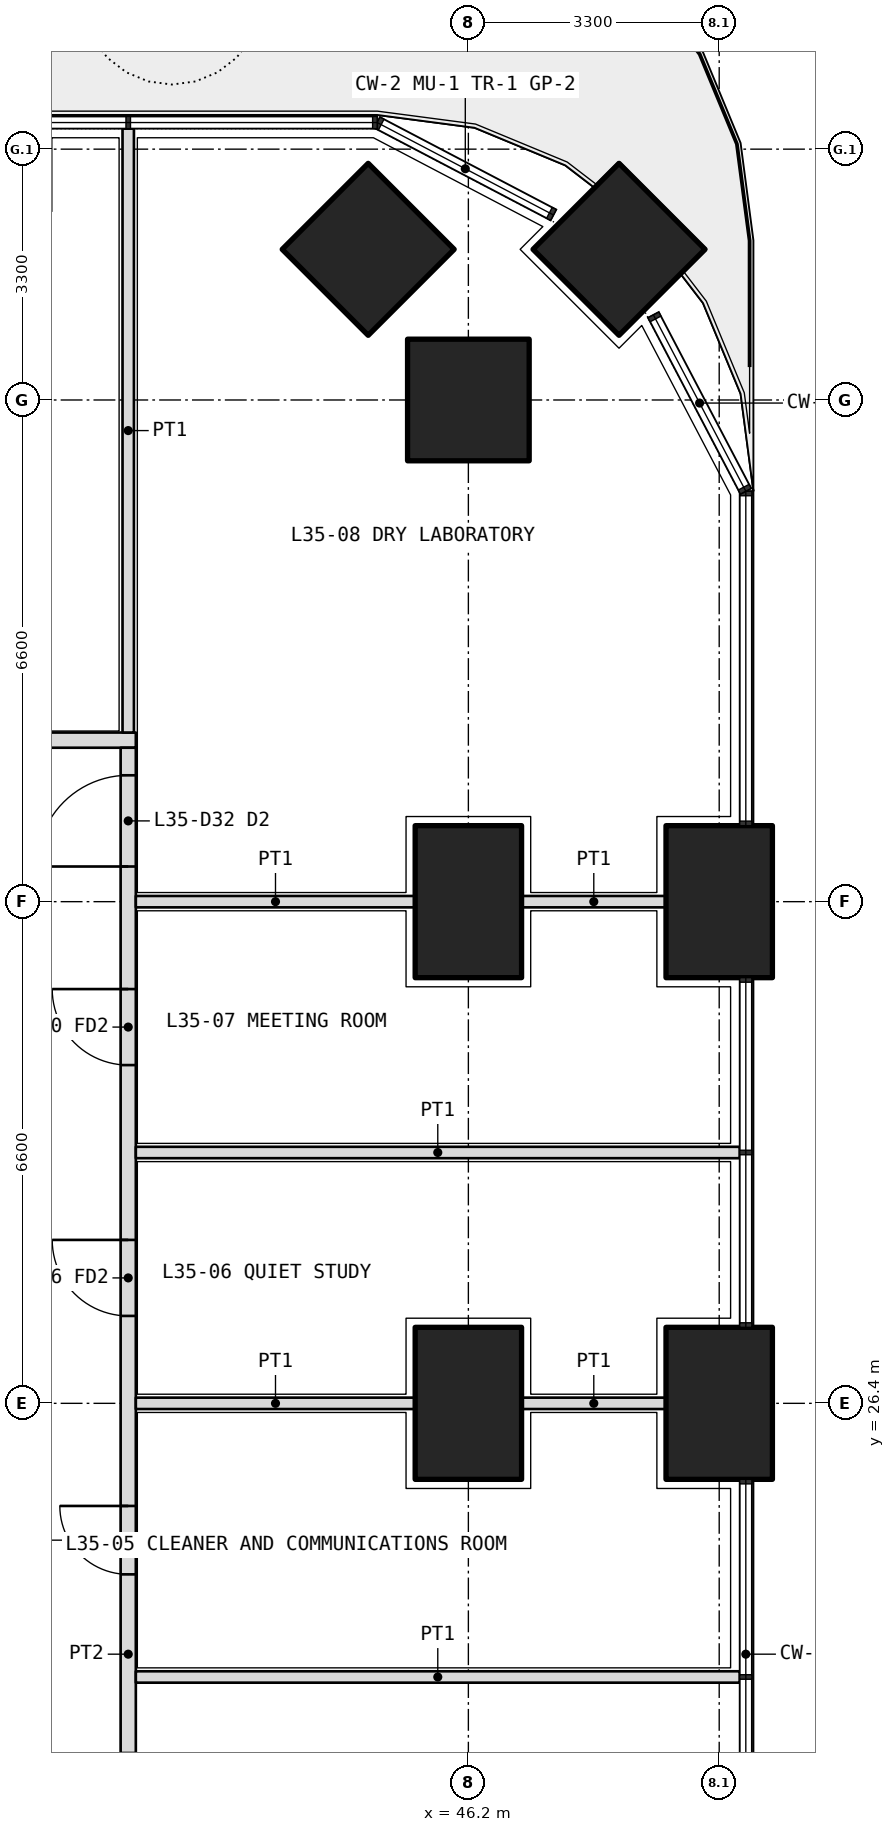
"""IFC4 building model, lengths in metres.
Left out: names, types, materials, properties, quantities, classifications, styles, units other than length and angle.
Written with IfcOpenShell. Run it as: python <this file> out.ifc"""

import sys

from ifc_helpers import new_model, si_unit, direction, frame, frame_2d, origin, origin_2d, place, context, subcontext, project, spatial, rectangle, extrude, element, fill, save


model = new_model("IFC4")
c1 = context("Model", 3, precision=1e-05, world=origin(), true_north=direction((0.0, 1.0)))
c2 = subcontext(c1, "Body", "Model", "MODEL_VIEW")
j1 = project(units=[si_unit("LENGTHUNIT", "METRE"), si_unit("PLANEANGLEUNIT", "RADIAN")], contexts=[c1])
p1 = place(None, origin())
s1 = spatial("IfcSite", under=j1, at=p1, CompositionType="ELEMENT")
p2 = place(p1, origin())
s2 = spatial("IfcBuilding", under=s1, at=p2, CompositionType="ELEMENT")
p3 = place(p2, frame((0.0, 0.0, 155.7)))
s3 = spatial("IfcBuildingStorey", under=s2, at=p3, CompositionType="ELEMENT", Elevation=155.7)
p4 = place(p3, frame((48.182, 41.582, 0.0), z_axis=(0.0, 0.0, 1.0), x_axis=(0.707106781187, 0.707106781187, 0.0)))
e1 = element("IfcColumn", 1, at=p4, inside=s3, PredefinedType="COLUMN", context=c2, shape_type="SweptSolid", body=[
    extrude(rectangle(XDim=1.6, YDim=1.6, at=origin_2d()), origin(), (0.0, 0.0, 1.0), 4.2),
])
for number, where, z_axis, x_axis in (
    (2, (49.5, 26.4, 0.0), (0.0, 0.0, 1.0), (0.0, 1.0, 0.0)),
    (3, (49.5, 33.0, 0.0), (0.0, 0.0, 1.0), (0.0, 1.0, 0.0)),
):
    element("IfcColumn", number, at=place(p3, frame(where, z_axis=z_axis, x_axis=x_axis)), inside=s3, PredefinedType="COLUMN", context=c2, shape_type="SweptSolid", body=[
        extrude(rectangle(XDim=2.0, YDim=1.4, at=origin_2d()), origin(), (0.0, 0.0, 1.0), 4.2),
    ])
for number, where, z_axis, x_axis in (
    (4, (46.2, 39.6, 0.0), (0.0, 0.0, 1.0), (1.0, 0.0, 0.0)),
    (5, (44.882, 41.582, 0.0), (0.0, 0.0, 1.0), (0.707, 0.707, 0.0)),
):
    element("IfcColumn", number, at=place(p3, frame(where, z_axis=z_axis, x_axis=x_axis)), inside=s3, PredefinedType="COLUMN", context=c2, shape_type="SweptSolid", body=[
        extrude(rectangle(XDim=1.6, YDim=1.6, at=origin_2d()), origin(), (0.0, 0.0, 1.0), 4.2),
    ])
for number, where, z_axis, x_axis in (
    (6, (46.2, 26.4, 0.0), (0.0, 0.0, 1.0), (0.0, 1.0, 0.0)),
    (7, (46.2, 33.0, 0.0), (0.0, 0.0, 1.0), (0.0, 1.0, 0.0)),
):
    element("IfcColumn", number, at=place(p3, frame(where, z_axis=z_axis, x_axis=x_axis)), inside=s3, PredefinedType="COLUMN", context=c2, shape_type="SweptSolid", body=[
        extrude(rectangle(XDim=2.0, YDim=1.4, at=origin_2d()), origin(), (0.0, 0.0, 1.0), 4.2),
    ])
p5 = place(p3, frame((10.975, 35.125, 0.0), z_axis=(0.0, 0.0, 1.0), x_axis=(1.0, 0.0, 0.0)))
e8 = element("IfcWall", 8, at=p5, inside=s3, PredefinedType="PARTITIONING", context=c2, shape_type="SweptSolid", body=[
    extrude(rectangle(XDim=30.85, YDim=0.2, at=frame_2d((15.425, 0.0))), origin(), (0.0, 0.0, 1.0), 2.85),
])
p6 = place(p5, frame((0.663, 0.0, 0.0)))
e9 = element("IfcOpeningElement", 9, at=p6, cuts=e8, PredefinedType="OPENING", context=c2, shape_type="SweptSolid", body=[
    extrude(rectangle(XDim=1.0, YDim=2.1, at=frame_2d((0.5, 1.05))), frame((0.0, 0.11, 0.0), z_axis=(0.0, -1.0, 0.0), x_axis=(1.0, 0.0, 0.0)), (0.0, 0.0, 1.0), 0.22),
])
p7 = place(p5, frame((3.275, 0.0, 0.0)))
e10 = element("IfcOpeningElement", 10, at=p7, cuts=e8, PredefinedType="OPENING", context=c2, shape_type="SweptSolid", body=[
    extrude(rectangle(XDim=1.2, YDim=2.1, at=frame_2d((0.6, 1.05))), frame((0.0, 0.11, 0.0), z_axis=(0.0, -1.0, 0.0), x_axis=(1.0, 0.0, 0.0)), (0.0, 0.0, 1.0), 0.22),
])
p8 = place(p5, frame((8.325, 0.0, 0.0)))
e11 = element("IfcOpeningElement", 11, at=p8, cuts=e8, PredefinedType="OPENING", context=c2, shape_type="SweptSolid", body=[
    extrude(rectangle(XDim=1.0, YDim=2.1, at=frame_2d((0.5, 1.05))), frame((0.0, 0.11, 0.0), z_axis=(0.0, -1.0, 0.0), x_axis=(1.0, 0.0, 0.0)), (0.0, 0.0, 1.0), 0.22),
])
p9 = place(p5, frame((13.375, 0.0, 0.0)))
e12 = element("IfcOpeningElement", 12, at=p9, cuts=e8, PredefinedType="OPENING", context=c2, shape_type="SweptSolid", body=[
    extrude(rectangle(XDim=1.0, YDim=2.1, at=frame_2d((0.5, 1.05))), frame((0.0, 0.11, 0.0), z_axis=(0.0, -1.0, 0.0), x_axis=(1.0, 0.0, 0.0)), (0.0, 0.0, 1.0), 0.22),
])
p10 = place(p5, frame((16.675, 0.0, 0.0)))
e13 = element("IfcOpeningElement", 13, at=p10, cuts=e8, PredefinedType="OPENING", context=c2, shape_type="SweptSolid", body=[
    extrude(rectangle(XDim=1.0, YDim=2.1, at=frame_2d((0.5, 1.05))), frame((0.0, 0.11, 0.0), z_axis=(0.0, -1.0, 0.0), x_axis=(1.0, 0.0, 0.0)), (0.0, 0.0, 1.0), 0.22),
])
p11 = place(p5, frame((24.137, 0.0, 0.0)))
e14 = element("IfcOpeningElement", 14, at=p11, cuts=e8, PredefinedType="OPENING", context=c2, shape_type="SweptSolid", body=[
    extrude(rectangle(XDim=1.2, YDim=2.1, at=frame_2d((0.6, 1.05))), frame((0.0, 0.11, 0.0), z_axis=(0.0, -1.0, 0.0), x_axis=(1.0, 0.0, 0.0)), (0.0, 0.0, 1.0), 0.22),
])
p12 = place(p3, frame((41.725, 11.175, 0.0), z_axis=(0.0, 0.0, 1.0), x_axis=(0.0, 1.0, 0.0)))
e15 = element("IfcWall", 15, at=p12, inside=s3, PredefinedType="PARTITIONING", context=c2, shape_type="SweptSolid", body=[
    extrude(rectangle(XDim=23.85, YDim=0.2, at=frame_2d((11.925, 0.0))), origin(), (0.0, 0.0, 1.0), 2.85),
])
p13 = place(p12, frame((3.663, 0.0, 0.0)))
e16 = element("IfcOpeningElement", 16, at=p13, cuts=e15, PredefinedType="OPENING", context=c2, shape_type="SweptSolid", body=[
    extrude(rectangle(XDim=1.2, YDim=2.1, at=frame_2d((0.6, 1.05))), frame((0.0, 0.11, 0.0), z_axis=(0.0, -1.0, 0.0), x_axis=(1.0, 0.0, 0.0)), (0.0, 0.0, 1.0), 0.22),
])
p14 = place(p12, frame((9.625, 0.0, 0.0)))
e17 = element("IfcOpeningElement", 17, at=p14, cuts=e15, PredefinedType="OPENING", context=c2, shape_type="SweptSolid", body=[
    extrude(rectangle(XDim=1.0, YDim=2.1, at=frame_2d((0.5, 1.05))), frame((0.0, 0.11, 0.0), z_axis=(0.0, -1.0, 0.0), x_axis=(1.0, 0.0, 0.0)), (0.0, 0.0, 1.0), 0.22),
])
p15 = place(p12, frame((12.975, 0.0, 0.0)))
e18 = element("IfcOpeningElement", 18, at=p15, cuts=e15, PredefinedType="OPENING", context=c2, shape_type="SweptSolid", body=[
    extrude(rectangle(XDim=0.9, YDim=2.1, at=frame_2d((0.45, 1.05))), frame((0.0, 0.11, 0.0), z_axis=(0.0, -1.0, 0.0), x_axis=(1.0, 0.0, 0.0)), (0.0, 0.0, 1.0), 0.22),
])
p16 = place(p12, frame((16.375, 0.0, 0.0)))
e19 = element("IfcOpeningElement", 19, at=p16, cuts=e15, PredefinedType="OPENING", context=c2, shape_type="SweptSolid", body=[
    extrude(rectangle(XDim=1.0, YDim=2.1, at=frame_2d((0.5, 1.05))), frame((0.0, 0.11, 0.0), z_axis=(0.0, -1.0, 0.0), x_axis=(1.0, 0.0, 0.0)), (0.0, 0.0, 1.0), 0.22),
])
p17 = place(p12, frame((19.675, 0.0, 0.0)))
e20 = element("IfcOpeningElement", 20, at=p17, cuts=e15, PredefinedType="OPENING", context=c2, shape_type="SweptSolid", body=[
    extrude(rectangle(XDim=1.0, YDim=2.1, at=frame_2d((0.5, 1.05))), frame((0.0, 0.11, 0.0), z_axis=(0.0, -1.0, 0.0), x_axis=(1.0, 0.0, 0.0)), (0.0, 0.0, 1.0), 0.22),
])
p18 = place(p12, frame((22.288, 0.0, 0.0)))
e21 = element("IfcOpeningElement", 21, at=p18, cuts=e15, PredefinedType="OPENING", context=c2, shape_type="SweptSolid", body=[
    extrude(rectangle(XDim=1.2, YDim=2.1, at=frame_2d((0.6, 1.05))), frame((0.0, 0.11, 0.0), z_axis=(0.0, -1.0, 0.0), x_axis=(1.0, 0.0, 0.0)), (0.0, 0.0, 1.0), 0.22),
])
p19 = place(p3, frame((41.725, 43.17, 0.0), z_axis=(0.0, 0.0, 1.0), x_axis=(0.0, -1.0, 0.0)))
e22 = element("IfcWall", 22, at=p19, inside=s3, PredefinedType="PARTITIONING", context=c2, shape_type="SweptSolid", body=[
    extrude(rectangle(XDim=7.945, YDim=0.15, at=frame_2d((3.972, 0.0))), origin(), (0.0, 0.0, 1.0), 2.7),
])
p20 = place(p3, frame((49.77, 22.8, 0.0), z_axis=(0.0, 0.0, 1.0), x_axis=(-1.0, 0.0, 0.0)))
e23 = element("IfcWall", 23, at=p20, inside=s3, PredefinedType="PARTITIONING", context=c2, shape_type="SweptSolid", body=[
    extrude(rectangle(XDim=7.945, YDim=0.15, at=frame_2d((3.973, 0.0))), origin(), (0.0, 0.0, 1.0), 2.7),
])
p21 = place(p3, frame((48.8, 26.4, 0.0), z_axis=(0.0, 0.0, 1.0), x_axis=(-1.0, 0.0, 0.0)))
e24 = element("IfcWall", 24, at=p21, inside=s3, PredefinedType="PARTITIONING", context=c2, shape_type="SweptSolid", body=[
    extrude(rectangle(XDim=1.9, YDim=0.15, at=frame_2d((0.95, 0.0))), origin(), (0.0, 0.0, 1.0), 2.85),
])
p22 = place(p3, frame((45.5, 26.4, 0.0), z_axis=(0.0, 0.0, 1.0), x_axis=(-1.0, 0.0, 0.0)))
e25 = element("IfcWall", 25, at=p22, inside=s3, PredefinedType="PARTITIONING", context=c2, shape_type="SweptSolid", body=[
    extrude(rectangle(XDim=3.675, YDim=0.15, at=frame_2d((1.837, 0.0))), origin(), (0.0, 0.0, 1.0), 2.85),
])
p23 = place(p3, frame((49.77, 29.7, 0.0), z_axis=(0.0, 0.0, 1.0), x_axis=(-1.0, 0.0, 0.0)))
e26 = element("IfcWall", 26, at=p23, inside=s3, PredefinedType="PARTITIONING", context=c2, shape_type="SweptSolid", body=[
    extrude(rectangle(XDim=7.945, YDim=0.15, at=frame_2d((3.973, 0.0))), origin(), (0.0, 0.0, 1.0), 2.7),
])
p24 = place(p3, frame((48.8, 33.0, 0.0), z_axis=(0.0, 0.0, 1.0), x_axis=(-1.0, 0.0, 0.0)))
e27 = element("IfcWall", 27, at=p24, inside=s3, PredefinedType="PARTITIONING", context=c2, shape_type="SweptSolid", body=[
    extrude(rectangle(XDim=1.9, YDim=0.15, at=frame_2d((0.95, 0.0))), origin(), (0.0, 0.0, 1.0), 2.85),
])
p25 = place(p3, frame((45.5, 33.0, 0.0), z_axis=(0.0, 0.0, 1.0), x_axis=(-1.0, 0.0, 0.0)))
e28 = element("IfcWall", 28, at=p25, inside=s3, PredefinedType="PARTITIONING", context=c2, shape_type="SweptSolid", body=[
    extrude(rectangle(XDim=3.675, YDim=0.15, at=frame_2d((1.837, 0.0))), origin(), (0.0, 0.0, 1.0), 2.85),
])
p26 = place(p15, origin())
e29 = element("IfcDoor", 29, at=p26, inside=s3, OperationType="SINGLE_SWING_RIGHT", PredefinedType="DOOR", context=c2, shape_type="SweptSolid", body=[
    extrude(rectangle(XDim=0.9, YDim=2.1, at=frame_2d((0.45, 1.05))), frame((0.0, 0.025, 0.0), z_axis=(0.0, -1.0, 0.0), x_axis=(1.0, 0.0, 0.0)), (0.0, 0.0, 1.0), 0.05),
])
fill(e18, e29)
p27 = place(p16, origin())
e30 = element("IfcDoor", 30, at=p27, inside=s3, OperationType="SINGLE_SWING_RIGHT", PredefinedType="DOOR", context=c2, shape_type="SweptSolid", body=[
    extrude(rectangle(XDim=1.0, YDim=2.1, at=frame_2d((0.5, 1.05))), frame((0.0, 0.025, 0.0), z_axis=(0.0, -1.0, 0.0), x_axis=(1.0, 0.0, 0.0)), (0.0, 0.0, 1.0), 0.05),
])
fill(e19, e30)
p28 = place(p17, origin())
e31 = element("IfcDoor", 31, at=p28, inside=s3, OperationType="SINGLE_SWING_RIGHT", PredefinedType="DOOR", context=c2, shape_type="SweptSolid", body=[
    extrude(rectangle(XDim=1.0, YDim=2.1, at=frame_2d((0.5, 1.05))), frame((0.0, 0.025, 0.0), z_axis=(0.0, -1.0, 0.0), x_axis=(1.0, 0.0, 0.0)), (0.0, 0.0, 1.0), 0.05),
])
fill(e20, e31)
p29 = place(p18, origin())
e32 = element("IfcDoor", 32, at=p29, inside=s3, OperationType="DOUBLE_DOOR_SINGLE_SWING", PredefinedType="DOOR", context=c2, shape_type="SweptSolid", body=[
    extrude(rectangle(XDim=1.2, YDim=2.1, at=frame_2d((0.6, 1.05))), frame((0.0, 0.025, 0.0), z_axis=(0.0, -1.0, 0.0), x_axis=(1.0, 0.0, 0.0)), (0.0, 0.0, 1.0), 0.05),
])
fill(e21, e32)
save(model, sys.argv[1])
